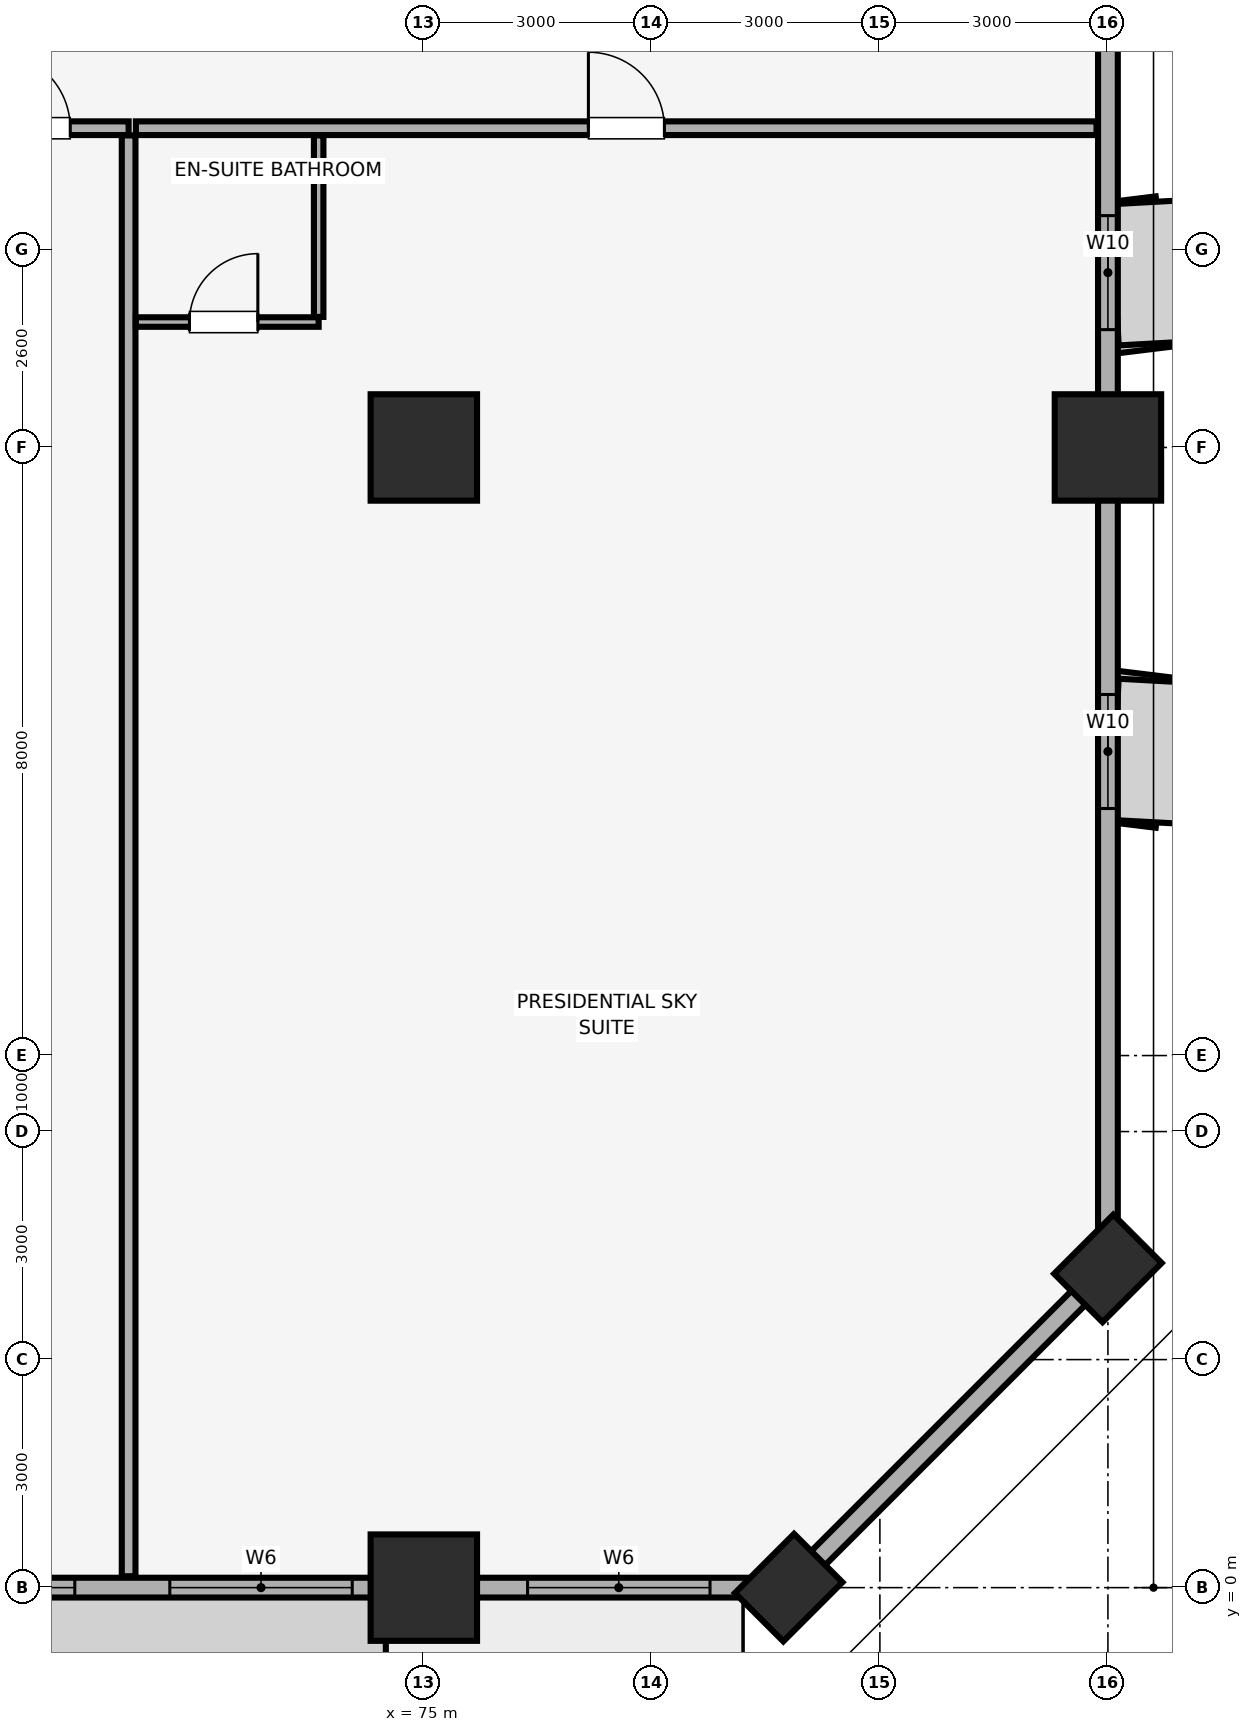
"""IFC4 building model, lengths in metres.
Left out: names, types, materials, properties, quantities, classifications, styles, units other than length and angle.
Written with IfcOpenShell. Run it as: python <this file> out.ifc"""

import sys

from ifc_helpers import new_model, si_unit, direction, frame, frame_2d, origin, origin_2d, place, context, subcontext, project, spatial, rectangle, extrude, element, fill, save


model = new_model("IFC4")
c1 = context("Model", 3, precision=1e-05, world=origin(), true_north=direction((0.0, 1.0)))
c2 = subcontext(c1, "Body", "Model", "MODEL_VIEW")
j1 = project(units=[si_unit("LENGTHUNIT", "METRE"), si_unit("PLANEANGLEUNIT", "RADIAN")], contexts=[c1])
p1 = place(None, origin())
s1 = spatial("IfcSite", under=j1, at=p1, CompositionType="ELEMENT")
p2 = place(p1, origin())
s2 = spatial("IfcBuilding", under=s1, at=p2, CompositionType="ELEMENT")
p3 = place(p2, frame((0.0, 0.0, 72.65)))
s3 = spatial("IfcBuildingStorey", under=s2, at=p3, CompositionType="ELEMENT", Elevation=72.65)
for number, where, z_axis, x_axis in (
    (1, (75.0, 0.0, 0.0), (0.0, 0.0, 1.0), (1.0, 0.0, 0.0)),
    (2, (84.0, 15.0, 0.0), (0.0, 0.0, 1.0), (1.0, 0.0, 0.0)),
):
    element("IfcColumn", number, at=place(p3, frame(where, z_axis=z_axis, x_axis=x_axis)), inside=s3, PredefinedType="COLUMN", context=c2, shape_type="SweptSolid", body=[
        extrude(rectangle(XDim=1.4, YDim=1.4, at=origin_2d()), origin(), (0.0, 0.0, 1.0), 3.51),
    ])
for number, where, z_axis, x_axis in (
    (3, (79.8, 0.0, 0.0), (0.0, 0.0, 1.0), (0.707, 0.707, 0.0)),
    (4, (84.0, 4.2, 0.0), (0.0, 0.0, 1.0), (0.707, 0.707, 0.0)),
):
    element("IfcColumn", number, at=place(p3, frame(where, z_axis=z_axis, x_axis=x_axis)), inside=s3, PredefinedType="PILASTER", context=c2, shape_type="SweptSolid", body=[
        extrude(rectangle(XDim=1.1, YDim=0.9, at=origin_2d()), origin(), (0.0, 0.0, 1.0), 3.51),
    ])
p4 = place(p3, frame((75.0, 15.0, 0.0), z_axis=(0.0, 0.0, 1.0), x_axis=(1.0, 0.0, 0.0)))
e5 = element("IfcColumn", 5, at=p4, inside=s3, PredefinedType="COLUMN", context=c2, shape_type="SweptSolid", body=[
    extrude(rectangle(XDim=1.4, YDim=1.4, at=origin_2d()), origin(), (0.0, 0.0, 1.0), 3.51),
])
p5 = place(p3, frame((4.2, 0.0, 0.0), z_axis=(0.0, 0.0, 1.0), x_axis=(1.0, 0.0, 0.0)))
e6 = element("IfcWall", 6, at=p5, inside=s3, PredefinedType="SOLIDWALL", context=c2, shape_type="SweptSolid", body=[
    extrude(rectangle(XDim=75.6, YDim=0.26, at=frame_2d((37.8, 0.0))), origin(), (0.0, 0.0, 1.0), 2.56),
])
p6 = place(p5, frame((21.383, 0.0, 0.0)))
e7 = element("IfcOpeningElement", 7, at=p6, cuts=e6, PredefinedType="OPENING", context=c2, shape_type="SweptSolid", body=[
    extrude(rectangle(XDim=1.1, YDim=2.15, at=frame_2d((0.55, 1.075))), frame((0.0, 0.14, 0.0), z_axis=(0.0, -1.0, 0.0), x_axis=(1.0, 0.0, 0.0)), (0.0, 0.0, 1.0), 0.28),
])
p7 = place(p5, frame((37.25, 0.0, 0.0)))
e8 = element("IfcOpeningElement", 8, at=p7, cuts=e6, PredefinedType="OPENING", context=c2, shape_type="SweptSolid", body=[
    extrude(rectangle(XDim=1.1, YDim=2.15, at=frame_2d((0.55, 1.075))), frame((0.0, 0.14, 0.0), z_axis=(0.0, -1.0, 0.0), x_axis=(1.0, 0.0, 0.0)), (0.0, 0.0, 1.0), 0.28),
])
p8 = place(p5, frame((53.117, 0.0, 0.0)))
e9 = element("IfcOpeningElement", 9, at=p8, cuts=e6, PredefinedType="OPENING", context=c2, shape_type="SweptSolid", body=[
    extrude(rectangle(XDim=1.1, YDim=2.15, at=frame_2d((0.55, 1.075))), frame((0.0, 0.14, 0.0), z_axis=(0.0, -1.0, 0.0), x_axis=(1.0, 0.0, 0.0)), (0.0, 0.0, 1.0), 0.28),
])
p9 = place(p5, frame((1.035, 0.0, 0.85)))
e10 = element("IfcOpeningElement", 10, at=p9, cuts=e6, PredefinedType="OPENING", context=c2, shape_type="SweptSolid", body=[
    extrude(rectangle(XDim=2.4, YDim=1.5, at=frame_2d((1.2, 0.75))), frame((0.0, 0.14, 0.0), z_axis=(0.0, -1.0, 0.0), x_axis=(1.0, 0.0, 0.0)), (0.0, 0.0, 1.0), 0.28),
])
p10 = place(p5, frame((5.691, 0.0, 0.85)))
e11 = element("IfcOpeningElement", 11, at=p10, cuts=e6, PredefinedType="OPENING", context=c2, shape_type="SweptSolid", body=[
    extrude(rectangle(XDim=2.4, YDim=1.5, at=frame_2d((1.2, 0.75))), frame((0.0, 0.14, 0.0), z_axis=(0.0, -1.0, 0.0), x_axis=(1.0, 0.0, 0.0)), (0.0, 0.0, 1.0), 0.28),
])
p11 = place(p5, frame((9.342, 0.0, 0.85)))
e12 = element("IfcOpeningElement", 12, at=p11, cuts=e6, PredefinedType="OPENING", context=c2, shape_type="SweptSolid", body=[
    extrude(rectangle(XDim=1.5, YDim=1.4, at=frame_2d((0.75, 0.7))), frame((0.0, 0.14, 0.0), z_axis=(0.0, -1.0, 0.0), x_axis=(1.0, 0.0, 0.0)), (0.0, 0.0, 1.0), 0.28),
])
p12 = place(p5, frame((13.458, 0.0, 0.85)))
e13 = element("IfcOpeningElement", 13, at=p12, cuts=e6, PredefinedType="OPENING", context=c2, shape_type="SweptSolid", body=[
    extrude(rectangle(XDim=2.4, YDim=1.5, at=frame_2d((1.2, 0.75))), frame((0.0, 0.14, 0.0), z_axis=(0.0, -1.0, 0.0), x_axis=(1.0, 0.0, 0.0)), (0.0, 0.0, 1.0), 0.28),
])
p13 = place(p5, frame((23.202, 0.0, 0.85)))
e14 = element("IfcOpeningElement", 14, at=p13, cuts=e6, PredefinedType="OPENING", context=c2, shape_type="SweptSolid", body=[
    extrude(rectangle(XDim=1.5, YDim=1.4, at=frame_2d((0.75, 0.7))), frame((0.0, 0.14, 0.0), z_axis=(0.0, -1.0, 0.0), x_axis=(1.0, 0.0, 0.0)), (0.0, 0.0, 1.0), 0.28),
])
p14 = place(p5, frame((28.8, 0.0, 0.85)))
e15 = element("IfcOpeningElement", 15, at=p14, cuts=e6, PredefinedType="OPENING", context=c2, shape_type="SweptSolid", body=[
    extrude(rectangle(XDim=2.4, YDim=1.5, at=frame_2d((1.2, 0.75))), frame((0.0, 0.14, 0.0), z_axis=(0.0, -1.0, 0.0), x_axis=(1.0, 0.0, 0.0)), (0.0, 0.0, 1.0), 0.28),
])
p15 = place(p5, frame((34.79, 0.0, 0.85)))
e16 = element("IfcOpeningElement", 16, at=p15, cuts=e6, PredefinedType="OPENING", context=c2, shape_type="SweptSolid", body=[
    extrude(rectangle(XDim=1.5, YDim=1.4, at=frame_2d((0.75, 0.7))), frame((0.0, 0.14, 0.0), z_axis=(0.0, -1.0, 0.0), x_axis=(1.0, 0.0, 0.0)), (0.0, 0.0, 1.0), 0.28),
])
p16 = place(p5, frame((39.31, 0.0, 0.85)))
e17 = element("IfcOpeningElement", 17, at=p16, cuts=e6, PredefinedType="OPENING", context=c2, shape_type="SweptSolid", body=[
    extrude(rectangle(XDim=1.5, YDim=1.4, at=frame_2d((0.75, 0.7))), frame((0.0, 0.14, 0.0), z_axis=(0.0, -1.0, 0.0), x_axis=(1.0, 0.0, 0.0)), (0.0, 0.0, 1.0), 0.28),
])
p17 = place(p5, frame((44.4, 0.0, 0.85)))
e18 = element("IfcOpeningElement", 18, at=p17, cuts=e6, PredefinedType="OPENING", context=c2, shape_type="SweptSolid", body=[
    extrude(rectangle(XDim=2.4, YDim=1.5, at=frame_2d((1.2, 0.75))), frame((0.0, 0.14, 0.0), z_axis=(0.0, -1.0, 0.0), x_axis=(1.0, 0.0, 0.0)), (0.0, 0.0, 1.0), 0.28),
])
p18 = place(p5, frame((50.848, 0.0, 0.85)))
e19 = element("IfcOpeningElement", 19, at=p18, cuts=e6, PredefinedType="OPENING", context=c2, shape_type="SweptSolid", body=[
    extrude(rectangle(XDim=1.5, YDim=1.4, at=frame_2d((0.75, 0.7))), frame((0.0, 0.14, 0.0), z_axis=(0.0, -1.0, 0.0), x_axis=(1.0, 0.0, 0.0)), (0.0, 0.0, 1.0), 0.28),
])
p19 = place(p5, frame((59.691, 0.0, 0.85)))
e20 = element("IfcOpeningElement", 20, at=p19, cuts=e6, PredefinedType="OPENING", context=c2, shape_type="SweptSolid", body=[
    extrude(rectangle(XDim=2.4, YDim=1.5, at=frame_2d((1.2, 0.75))), frame((0.0, 0.14, 0.0), z_axis=(0.0, -1.0, 0.0), x_axis=(1.0, 0.0, 0.0)), (0.0, 0.0, 1.0), 0.28),
])
p20 = place(p5, frame((64.708, 0.0, 0.85)))
e21 = element("IfcOpeningElement", 21, at=p20, cuts=e6, PredefinedType="OPENING", context=c2, shape_type="SweptSolid", body=[
    extrude(rectangle(XDim=1.5, YDim=1.4, at=frame_2d((0.75, 0.7))), frame((0.0, 0.14, 0.0), z_axis=(0.0, -1.0, 0.0), x_axis=(1.0, 0.0, 0.0)), (0.0, 0.0, 1.0), 0.28),
])
p21 = place(p5, frame((67.458, 0.0, 0.85)))
e22 = element("IfcOpeningElement", 22, at=p21, cuts=e6, PredefinedType="OPENING", context=c2, shape_type="SweptSolid", body=[
    extrude(rectangle(XDim=2.4, YDim=1.5, at=frame_2d((1.2, 0.75))), frame((0.0, 0.14, 0.0), z_axis=(0.0, -1.0, 0.0), x_axis=(1.0, 0.0, 0.0)), (0.0, 0.0, 1.0), 0.28),
])
p22 = place(p5, frame((72.165, 0.0, 0.85)))
e23 = element("IfcOpeningElement", 23, at=p22, cuts=e6, PredefinedType="OPENING", context=c2, shape_type="SweptSolid", body=[
    extrude(rectangle(XDim=2.4, YDim=1.5, at=frame_2d((1.2, 0.75))), frame((0.0, 0.14, 0.0), z_axis=(0.0, -1.0, 0.0), x_axis=(1.0, 0.0, 0.0)), (0.0, 0.0, 1.0), 0.28),
])
p23 = place(p3, frame((79.8, 0.0, 0.0), z_axis=(0.0, 0.0, 1.0), x_axis=(0.707106781187, 0.707106781187, 0.0)))
e24 = element("IfcWall", 24, at=p23, inside=s3, PredefinedType="SOLIDWALL", context=c2, shape_type="SweptSolid", body=[
    extrude(rectangle(XDim=5.94, YDim=0.26, at=frame_2d((2.97, 0.0))), origin(), (0.0, 0.0, 1.0), 2.56),
])
p24 = place(p3, frame((84.0, 4.2, 0.0), z_axis=(0.0, 0.0, 1.0), x_axis=(0.0, 1.0, 0.0)))
e25 = element("IfcWall", 25, at=p24, inside=s3, PredefinedType="SOLIDWALL", context=c2, shape_type="SweptSolid", body=[
    extrude(rectangle(XDim=40.6, YDim=0.26, at=frame_2d((20.3, 0.0))), origin(), (0.0, 0.0, 1.0), 2.56),
])
p25 = place(p24, frame((6.05, 0.0, 0.85)))
e26 = element("IfcOpeningElement", 26, at=p25, cuts=e25, PredefinedType="OPENING", context=c2, shape_type="SweptSolid", body=[
    extrude(rectangle(XDim=1.5, YDim=1.4, at=frame_2d((0.75, 0.7))), frame((0.0, 0.14, 0.0), z_axis=(0.0, -1.0, 0.0), x_axis=(1.0, 0.0, 0.0)), (0.0, 0.0, 1.0), 0.28),
])
p26 = place(p24, frame((12.35, 0.0, 0.85)))
e27 = element("IfcOpeningElement", 27, at=p26, cuts=e25, PredefinedType="OPENING", context=c2, shape_type="SweptSolid", body=[
    extrude(rectangle(XDim=1.5, YDim=1.4, at=frame_2d((0.75, 0.7))), frame((0.0, 0.14, 0.0), z_axis=(0.0, -1.0, 0.0), x_axis=(1.0, 0.0, 0.0)), (0.0, 0.0, 1.0), 0.28),
])
p27 = place(p24, frame((22.165, 0.0, 0.85)))
e28 = element("IfcOpeningElement", 28, at=p27, cuts=e25, PredefinedType="OPENING", context=c2, shape_type="SweptSolid", body=[
    extrude(rectangle(XDim=1.5, YDim=1.4, at=frame_2d((0.75, 0.7))), frame((0.0, 0.14, 0.0), z_axis=(0.0, -1.0, 0.0), x_axis=(1.0, 0.0, 0.0)), (0.0, 0.0, 1.0), 0.28),
])
p28 = place(p24, frame((29.2, 0.0, 0.85)))
e29 = element("IfcOpeningElement", 29, at=p28, cuts=e25, PredefinedType="OPENING", context=c2, shape_type="SweptSolid", body=[
    extrude(rectangle(XDim=1.5, YDim=1.4, at=frame_2d((0.75, 0.7))), frame((0.0, 0.14, 0.0), z_axis=(0.0, -1.0, 0.0), x_axis=(1.0, 0.0, 0.0)), (0.0, 0.0, 1.0), 0.28),
])
p29 = place(p24, frame((37.365, 0.0, 0.85)))
e30 = element("IfcOpeningElement", 30, at=p29, cuts=e25, PredefinedType="OPENING", context=c2, shape_type="SweptSolid", body=[
    extrude(rectangle(XDim=1.5, YDim=1.4, at=frame_2d((0.75, 0.7))), frame((0.0, 0.14, 0.0), z_axis=(0.0, -1.0, 0.0), x_axis=(1.0, 0.0, 0.0)), (0.0, 0.0, 1.0), 0.28),
])
p30 = place(p3, frame((62.878, 19.2, 0.0), z_axis=(0.0, 0.0, 1.0), x_axis=(1.0, 0.0, 0.0)))
e31 = element("IfcWall", 31, at=p30, inside=s3, PredefinedType="PARTITIONING", context=c2, shape_type="SweptSolid", body=[
    extrude(rectangle(XDim=8.238, YDim=0.18, at=frame_2d((4.119, 0.0))), origin(), (0.0, 0.0, 1.0), 3.51),
])
p31 = place(p30, frame((6.47, 0.0, 0.0)))
e32 = element("IfcOpeningElement", 32, at=p31, cuts=e31, PredefinedType="OPENING", context=c2, shape_type="SweptSolid", body=[
    extrude(rectangle(XDim=1.0, YDim=2.15, at=frame_2d((0.5, 1.075))), frame((0.0, 0.1, 0.0), z_axis=(0.0, -1.0, 0.0), x_axis=(1.0, 0.0, 0.0)), (0.0, 0.0, 1.0), 0.2),
])
p32 = place(p3, frame((71.116, 0.15, 0.0), z_axis=(0.0, 0.0, 1.0), x_axis=(0.0, 1.0, 0.0)))
e33 = element("IfcWall", 33, at=p32, inside=s3, PredefinedType="PARTITIONING", context=c2, shape_type="SweptSolid", body=[
    extrude(rectangle(XDim=18.955, YDim=0.18, at=frame_2d((9.478, 0.0))), origin(), (0.0, 0.0, 1.0), 2.898),
])
p33 = place(p3, frame((71.211, 19.2, 0.0), z_axis=(0.0, 0.0, 1.0), x_axis=(1.0, 0.0, 0.0)))
e34 = element("IfcWall", 34, at=p33, inside=s3, PredefinedType="PARTITIONING", context=c2, shape_type="SweptSolid", body=[
    extrude(rectangle(XDim=12.639, YDim=0.18, at=frame_2d((6.319, 0.0))), origin(), (0.0, 0.0, 1.0), 3.51),
])
p34 = place(p33, frame((5.954, 0.0, 0.0)))
e35 = element("IfcOpeningElement", 35, at=p34, cuts=e34, PredefinedType="OPENING", context=c2, shape_type="SweptSolid", body=[
    extrude(rectangle(XDim=1.0, YDim=2.15, at=frame_2d((0.5, 1.075))), frame((0.0, 0.1, 0.0), z_axis=(0.0, -1.0, 0.0), x_axis=(1.0, 0.0, 0.0)), (0.0, 0.0, 1.0), 0.2),
])
p35 = place(p3, frame((71.211, 16.65, 0.0), z_axis=(0.0, 0.0, 1.0), x_axis=(1.0, 0.0, 0.0)))
e36 = element("IfcWall", 36, at=p35, inside=s3, PredefinedType="PARTITIONING", context=c2, shape_type="SweptSolid", body=[
    extrude(rectangle(XDim=2.405, YDim=0.125, at=frame_2d((1.203, 0.0))), origin(), (0.0, 0.0, 1.0), 3.51),
])
p36 = place(p35, frame((0.705, 0.0, 0.0)))
e37 = element("IfcOpeningElement", 37, at=p36, cuts=e36, PredefinedType="OPENING", context=c2, shape_type="SweptSolid", body=[
    extrude(rectangle(XDim=0.9, YDim=2.1, at=frame_2d((0.45, 1.05))), frame((0.0, 0.073, 0.0), z_axis=(0.0, -1.0, 0.0), x_axis=(1.0, 0.0, 0.0)), (0.0, 0.0, 1.0), 0.145),
])
p37 = place(p3, frame((73.616, 16.718, 0.0), z_axis=(0.0, 0.0, 1.0), x_axis=(0.0, 1.0, 0.0)))
e38 = element("IfcWall", 38, at=p37, inside=s3, PredefinedType="PARTITIONING", context=c2, shape_type="SweptSolid", body=[
    extrude(rectangle(XDim=2.387, YDim=0.125, at=frame_2d((1.194, 0.0))), origin(), (0.0, 0.0, 1.0), 3.51),
])
p38 = place(p20, origin())
e39 = element("IfcWindow", 39, at=p38, inside=s3, PartitioningType="SINGLE_PANEL", PredefinedType="WINDOW", context=c2, shape_type="SweptSolid", body=[
    extrude(rectangle(XDim=1.5, YDim=1.4, at=frame_2d((0.75, 0.7))), frame((0.0, 0.03, 0.0), z_axis=(0.0, -1.0, 0.0), x_axis=(1.0, 0.0, 0.0)), (0.0, 0.0, 1.0), 0.06),
])
fill(e21, e39)
p39 = place(p21, origin())
e40 = element("IfcWindow", 40, at=p39, inside=s3, PartitioningType="SINGLE_PANEL", PredefinedType="WINDOW", context=c2, shape_type="SweptSolid", body=[
    extrude(rectangle(XDim=2.4, YDim=1.5, at=frame_2d((1.2, 0.75))), frame((0.0, 0.03, 0.0), z_axis=(0.0, -1.0, 0.0), x_axis=(1.0, 0.0, 0.0)), (0.0, 0.0, 1.0), 0.06),
])
fill(e22, e40)
p40 = place(p22, origin())
e41 = element("IfcWindow", 41, at=p40, inside=s3, PartitioningType="SINGLE_PANEL", PredefinedType="WINDOW", context=c2, shape_type="SweptSolid", body=[
    extrude(rectangle(XDim=2.4, YDim=1.5, at=frame_2d((1.2, 0.75))), frame((0.0, 0.03, 0.0), z_axis=(0.0, -1.0, 0.0), x_axis=(1.0, 0.0, 0.0)), (0.0, 0.0, 1.0), 0.06),
])
fill(e23, e41)
p41 = place(p25, origin())
e42 = element("IfcWindow", 42, at=p41, inside=s3, PartitioningType="SINGLE_PANEL", PredefinedType="WINDOW", context=c2, shape_type="SweptSolid", body=[
    extrude(rectangle(XDim=1.5, YDim=1.4, at=frame_2d((0.75, 0.7))), frame((0.0, 0.03, 0.0), z_axis=(0.0, -1.0, 0.0), x_axis=(1.0, 0.0, 0.0)), (0.0, 0.0, 1.0), 0.06),
])
fill(e26, e42)
p42 = place(p26, origin())
e43 = element("IfcWindow", 43, at=p42, inside=s3, PartitioningType="SINGLE_PANEL", PredefinedType="WINDOW", context=c2, shape_type="SweptSolid", body=[
    extrude(rectangle(XDim=1.5, YDim=1.4, at=frame_2d((0.75, 0.7))), frame((0.0, 0.03, 0.0), z_axis=(0.0, -1.0, 0.0), x_axis=(1.0, 0.0, 0.0)), (0.0, 0.0, 1.0), 0.06),
])
fill(e27, e43)
p43 = place(p31, origin())
e44 = element("IfcDoor", 44, at=p43, inside=s3, OperationType="SINGLE_SWING_LEFT", PredefinedType="DOOR", context=c2, shape_type="SweptSolid", body=[
    extrude(rectangle(XDim=1.0, YDim=2.15, at=frame_2d((0.5, 1.075))), frame((0.0, 0.025, 0.0), z_axis=(0.0, -1.0, 0.0), x_axis=(1.0, 0.0, 0.0)), (0.0, 0.0, 1.0), 0.05),
])
fill(e32, e44)
p44 = place(p34, origin())
e45 = element("IfcDoor", 45, at=p44, inside=s3, OperationType="SINGLE_SWING_LEFT", PredefinedType="DOOR", context=c2, shape_type="SweptSolid", body=[
    extrude(rectangle(XDim=1.0, YDim=2.15, at=frame_2d((0.5, 1.075))), frame((0.0, 0.025, 0.0), z_axis=(0.0, -1.0, 0.0), x_axis=(1.0, 0.0, 0.0)), (0.0, 0.0, 1.0), 0.05),
])
fill(e35, e45)
p45 = place(p36, origin())
e46 = element("IfcDoor", 46, at=p45, inside=s3, OperationType="SINGLE_SWING_RIGHT", PredefinedType="DOOR", context=c2, shape_type="SweptSolid", body=[
    extrude(rectangle(XDim=0.9, YDim=2.1, at=frame_2d((0.45, 1.05))), frame((0.0, 0.025, 0.0), z_axis=(0.0, -1.0, 0.0), x_axis=(1.0, 0.0, 0.0)), (0.0, 0.0, 1.0), 0.05),
])
fill(e37, e46)
save(model, sys.argv[1])
